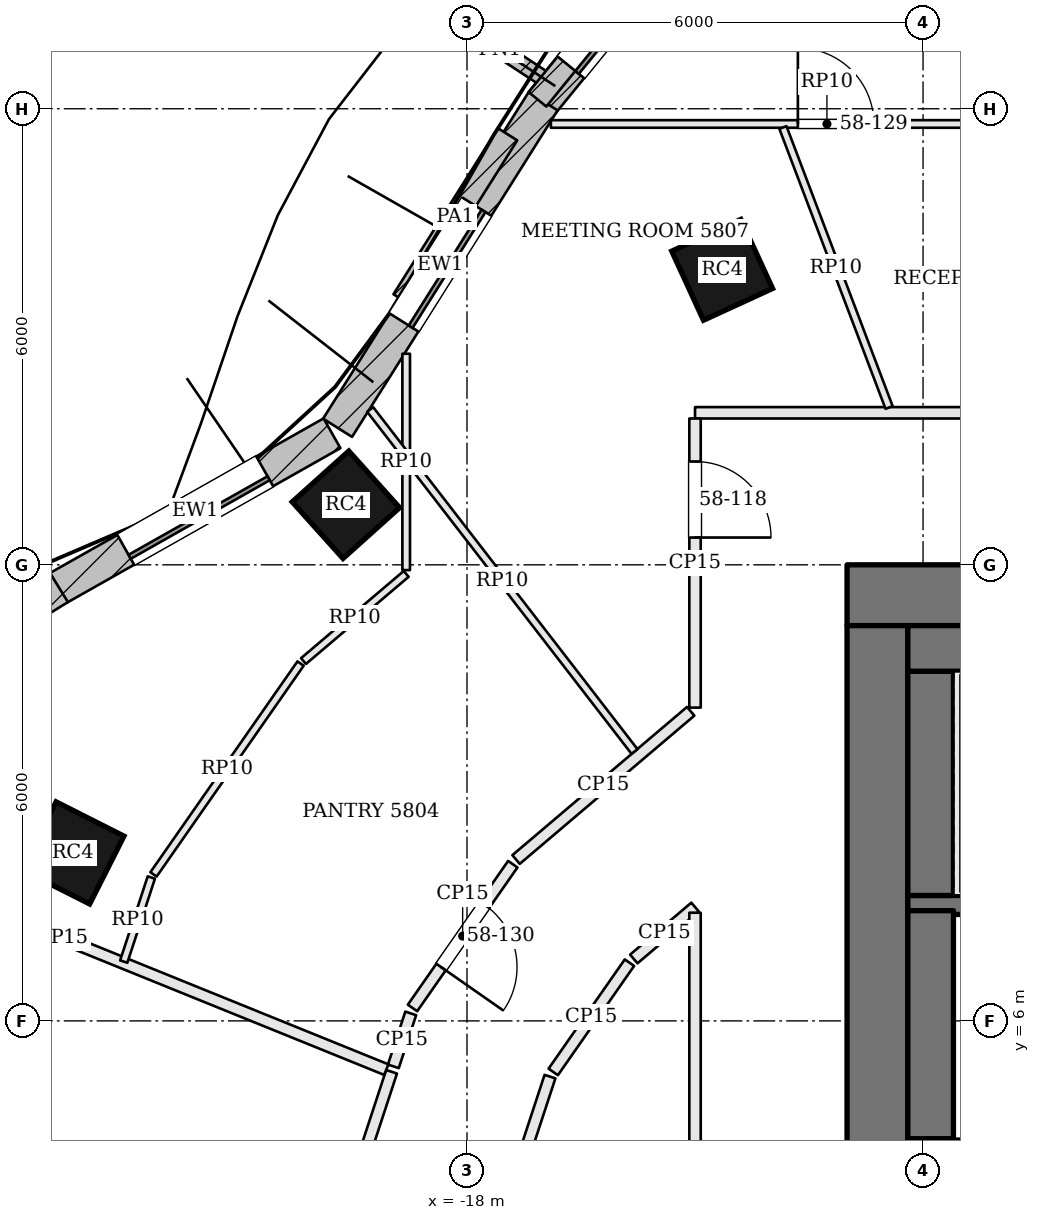
"""IFC4 building model, lengths in metres.
Left out: names, types, materials, properties, quantities, classifications, styles, units other than length and angle.
Written with IfcOpenShell. Run it as: python <this file> out.ifc"""

import sys

from ifc_helpers import new_model, si_unit, direction, frame, frame_2d, origin, origin_2d, place, context, subcontext, project, spatial, rectangle, extrude, element, fill, save


model = new_model("IFC4")
c1 = context("Model", 3, precision=1e-05, world=origin(), true_north=direction((0.0, 1.0)))
c2 = subcontext(c1, "Body", "Model", "MODEL_VIEW")
j1 = project(units=[si_unit("LENGTHUNIT", "METRE"), si_unit("PLANEANGLEUNIT", "RADIAN")], contexts=[c1])
p1 = place(None, origin())
s1 = spatial("IfcSite", under=j1, at=p1, CompositionType="ELEMENT")
p2 = place(p1, origin())
s2 = spatial("IfcBuilding", under=s1, at=p2, CompositionType="ELEMENT")
p3 = place(p2, frame((0.0, 0.0, 237.0)))
s3 = spatial("IfcBuildingStorey", under=s2, at=p3, CompositionType="ELEMENT", Elevation=237.0)
p4 = place(p3, frame((-13.0, 11.6, 0.0), z_axis=(0.0, 0.0, 1.0), x_axis=(1.0, 0.0, 0.0)))
e1 = element("IfcWall", 1, at=p4, inside=s3, PredefinedType="SHEAR", context=c2, shape_type="SweptSolid", body=[
    extrude(rectangle(XDim=26.0, YDim=0.8, at=frame_2d((13.0, 0.0))), origin(), (0.0, 0.0, 1.0), 3.9),
])
p5 = place(p4, frame((8.575, 0.0, 0.0)))
e2 = element("IfcOpeningElement", 2, at=p5, cuts=e1, PredefinedType="OPENING", context=c2, shape_type="SweptSolid", body=[
    extrude(rectangle(XDim=0.7, YDim=2.1, at=frame_2d((0.35, 1.05))), frame((0.0, 0.41, 0.0), z_axis=(0.0, -1.0, 0.0), x_axis=(1.0, 0.0, 0.0)), (0.0, 0.0, 1.0), 0.82),
])
p6 = place(p4, frame((10.625, 0.0, 0.0)))
e3 = element("IfcOpeningElement", 3, at=p6, cuts=e1, PredefinedType="OPENING", context=c2, shape_type="SweptSolid", body=[
    extrude(rectangle(XDim=0.7, YDim=2.1, at=frame_2d((0.35, 1.05))), frame((0.0, 0.41, 0.0), z_axis=(0.0, -1.0, 0.0), x_axis=(1.0, 0.0, 0.0)), (0.0, 0.0, 1.0), 0.82),
])
p7 = place(p4, frame((13.325, 0.0, 0.0)))
e4 = element("IfcOpeningElement", 4, at=p7, cuts=e1, PredefinedType="OPENING", context=c2, shape_type="SweptSolid", body=[
    extrude(rectangle(XDim=1.0, YDim=2.1, at=frame_2d((0.5, 1.05))), frame((0.0, 0.41, 0.0), z_axis=(0.0, -1.0, 0.0), x_axis=(1.0, 0.0, 0.0)), (0.0, 0.0, 1.0), 0.82),
])
p8 = place(p4, frame((15.65, 0.0, 0.0)))
e5 = element("IfcOpeningElement", 5, at=p8, cuts=e1, PredefinedType="OPENING", context=c2, shape_type="SweptSolid", body=[
    extrude(rectangle(XDim=1.0, YDim=2.1, at=frame_2d((0.5, 1.05))), frame((0.0, 0.41, 0.0), z_axis=(0.0, -1.0, 0.0), x_axis=(1.0, 0.0, 0.0)), (0.0, 0.0, 1.0), 0.82),
])
p9 = place(p3, frame((-12.6, -2.2, 0.0), z_axis=(0.0, 0.0, 1.0), x_axis=(0.0, 1.0, 0.0)))
e6 = element("IfcWall", 6, at=p9, inside=s3, PredefinedType="SHEAR", context=c2, shape_type="SweptSolid", body=[
    extrude(rectangle(XDim=13.4, YDim=0.8, at=frame_2d((6.7, 0.0))), origin(), (0.0, 0.0, 1.0), 3.9),
])
p10 = place(p9, frame((4.2, 0.0, 0.0)))
e7 = element("IfcOpeningElement", 7, at=p10, cuts=e6, PredefinedType="OPENING", context=c2, shape_type="SweptSolid", body=[
    extrude(rectangle(XDim=1.8, YDim=2.1, at=frame_2d((0.9, 1.05))), frame((0.0, 0.41, 0.0), z_axis=(0.0, -1.0, 0.0), x_axis=(1.0, 0.0, 0.0)), (0.0, 0.0, 1.0), 0.82),
])
for number, where, z_axis, x_axis in (
    (8, (-14.643, 15.881, 0.0), (0.0, 0.0, 1.0), (-0.909, -0.417, 0.0)),
    (9, (-19.593, 12.79, 0.0), (0.0, 0.0, 1.0), (-0.744, -0.668, 0.0)),
    (10, (-23.185, 8.21, 0.0), (0.0, 0.0, 1.0), (-0.451, -0.893, 0.0)),
):
    element("IfcColumn", number, at=place(p3, frame(where, z_axis=z_axis, x_axis=x_axis)), inside=s3, PredefinedType="COLUMN", context=c2, shape_type="SweptSolid", body=[
        extrude(rectangle(XDim=1.0, YDim=1.0, at=origin_2d()), origin(), (0.0, 0.0, 1.0), 3.9),
    ])
p11 = place(p3, frame((-14.926, 20.641, 0.0), z_axis=(0.0, 0.0, 1.0), x_axis=(-0.631548074669, -0.775336720001, 0.0)))
e11 = element("IfcWall", 11, at=p11, inside=s3, PredefinedType="SOLIDWALL", context=c2, shape_type="SweptSolid", body=[
    extrude(rectangle(XDim=3.308, YDim=0.45, at=frame_2d((1.654, 0.0))), origin(), (0.0, 0.0, 1.0), 3.7),
])
p12 = place(p11, frame((0.604, 0.0, 0.9)))
e12 = element("IfcOpeningElement", 12, at=p12, cuts=e11, PredefinedType="OPENING", context=c2, shape_type="SweptSolid", body=[
    extrude(rectangle(XDim=2.1, YDim=2.3, at=frame_2d((1.05, 1.15))), frame((0.0, 0.235, 0.0), z_axis=(0.0, -1.0, 0.0), x_axis=(1.0, 0.0, 0.0)), (0.0, 0.0, 1.0), 0.47),
])
p13 = place(p3, frame((-16.998, 18.099, 0.0), z_axis=(0.0, 0.0, 1.0), x_axis=(-0.532745661304, -0.846275404559, 0.0)))
e13 = element("IfcWall", 13, at=p13, inside=s3, PredefinedType="SOLIDWALL", context=c2, shape_type="SweptSolid", body=[
    extrude(rectangle(XDim=5.076, YDim=0.45, at=frame_2d((2.538, 0.0))), origin(), (0.0, 0.0, 1.0), 3.7),
])
p14 = place(p13, frame((1.638, 0.0, 0.9)))
e14 = element("IfcOpeningElement", 14, at=p14, cuts=e13, PredefinedType="OPENING", context=c2, shape_type="SweptSolid", body=[
    extrude(rectangle(XDim=1.8, YDim=2.3, at=frame_2d((0.9, 1.15))), frame((0.0, 0.235, 0.0), z_axis=(0.0, -1.0, 0.0), x_axis=(1.0, 0.0, 0.0)), (0.0, 0.0, 1.0), 0.47),
])
p15 = place(p3, frame((-19.776, 13.731, 0.0), z_axis=(0.0, 0.0, 1.0), x_axis=(-0.870610133829, -0.491973571318, 0.0)))
e15 = element("IfcWall", 15, at=p15, inside=s3, PredefinedType="SOLIDWALL", context=c2, shape_type="SweptSolid", body=[
    extrude(rectangle(XDim=4.134, YDim=0.45, at=frame_2d((2.067, 0.0))), origin(), (0.0, 0.0, 1.0), 3.7),
])
p16 = place(p15, frame((1.017, 0.0, 0.9)))
e16 = element("IfcOpeningElement", 16, at=p16, cuts=e15, PredefinedType="OPENING", context=c2, shape_type="SweptSolid", body=[
    extrude(rectangle(XDim=2.1, YDim=2.3, at=frame_2d((1.05, 1.15))), frame((0.0, 0.235, 0.0), z_axis=(0.0, -1.0, 0.0), x_axis=(1.0, 0.0, 0.0)), (0.0, 0.0, 1.0), 0.47),
])
p17 = place(p3, frame((-23.368, 11.701, 0.0), z_axis=(0.0, 0.0, 1.0), x_axis=(-0.850251408633, -0.526376806211, 0.0)))
e17 = element("IfcWall", 17, at=p17, inside=s3, PredefinedType="SOLIDWALL", context=c2, shape_type="SweptSolid", body=[
    extrude(rectangle(XDim=5.302, YDim=0.45, at=frame_2d((2.651, 0.0))), origin(), (0.0, 0.0, 1.0), 3.7),
])
p18 = place(p17, frame((1.601, 0.0, 0.9)))
e18 = element("IfcOpeningElement", 18, at=p18, cuts=e17, PredefinedType="OPENING", context=c2, shape_type="SweptSolid", body=[
    extrude(rectangle(XDim=2.1, YDim=2.3, at=frame_2d((1.05, 1.15))), frame((0.0, 0.235, 0.0), z_axis=(0.0, -1.0, 0.0), x_axis=(1.0, 0.0, 0.0)), (0.0, 0.0, 1.0), 0.47),
])
p19 = place(p3, frame((-16.838, 18.298, 0.0), z_axis=(0.0, 0.0, 1.0), x_axis=(-0.835871900419, 0.548924554097, 0.0)))
e19 = element("IfcWall", 19, at=p19, inside=s3, PredefinedType="SOLIDWALL", context=c2, shape_type="SweptSolid", body=[
    extrude(rectangle(XDim=1.75, YDim=0.2, at=frame_2d((0.875, 0.0))), origin(), (0.0, 0.0, 1.0), 3.7),
])
p20 = place(p3, frame((-15.063, 20.591, 3.9), z_axis=(0.0, 0.0, 1.0), x_axis=(-0.631539712948, -0.775343530939, 0.0)))
e20 = element("IfcWall", 20, at=p20, inside=s3, PredefinedType="PARAPET", context=c2, shape_type="SweptSolid", body=[
    extrude(rectangle(XDim=3.182, YDim=0.3, at=frame_2d((1.591, 0.0))), origin(), (0.0, 0.0, 1.0), 1.1),
])
p21 = place(p3, frame((-17.466, 17.664, 3.9), z_axis=(0.0, 0.0, 1.0), x_axis=(-0.532743008157, -0.846277074758, 0.0)))
e21 = element("IfcWall", 21, at=p21, inside=s3, PredefinedType="PARAPET", context=c2, shape_type="SweptSolid", body=[
    extrude(rectangle(XDim=2.581, YDim=0.3, at=frame_2d((1.29, 0.0))), origin(), (0.0, 0.0, 1.0), 1.1),
])
p22 = place(p3, frame((-12.2, 4.35, 0.0), z_axis=(0.0, 0.0, 1.0), x_axis=(1.0, 0.0, 0.0)))
e22 = element("IfcWall", 22, at=p22, inside=s3, PredefinedType="SOLIDWALL", context=c2, shape_type="SweptSolid", body=[
    extrude(rectangle(XDim=7.1, YDim=0.2, at=frame_2d((3.55, 0.0))), origin(), (0.0, 0.0, 1.0), 3.7),
])
p23 = place(p22, frame((4.4, 0.0, 0.0)))
e23 = element("IfcOpeningElement", 23, at=p23, cuts=e22, PredefinedType="OPENING", context=c2, shape_type="SweptSolid", body=[
    extrude(rectangle(XDim=1.2, YDim=2.1, at=frame_2d((0.6, 1.05))), frame((0.0, 0.11, 0.0), z_axis=(0.0, -1.0, 0.0), x_axis=(1.0, 0.0, 0.0)), (0.0, 0.0, 1.0), 0.22),
])
p24 = place(p22, frame((1.1, 0.0, 0.0)))
e24 = element("IfcOpeningElement", 24, at=p24, cuts=e22, PredefinedType="OPENING", context=c2, shape_type="SweptSolid", body=[
    extrude(rectangle(XDim=1.2, YDim=2.1, at=frame_2d((0.6, 1.05))), frame((0.0, 0.11, 0.0), z_axis=(0.0, -1.0, 0.0), x_axis=(1.0, 0.0, 0.0)), (0.0, 0.0, 1.0), 0.22),
])
p25 = place(p3, frame((-12.2, 7.525, 0.0), z_axis=(0.0, 0.0, 1.0), x_axis=(1.0, 0.0, 0.0)))
e25 = element("IfcWall", 25, at=p25, inside=s3, PredefinedType="SOLIDWALL", context=c2, shape_type="SweptSolid", body=[
    extrude(rectangle(XDim=7.1, YDim=0.25, at=frame_2d((3.55, 0.0))), origin(), (0.0, 0.0, 1.0), 3.7),
])
p26 = place(p25, frame((5.8, 0.0, 0.0)))
e26 = element("IfcOpeningElement", 26, at=p26, cuts=e25, PredefinedType="OPENING", context=c2, shape_type="SweptSolid", body=[
    extrude(rectangle(XDim=1.2, YDim=2.1, at=frame_2d((0.6, 1.05))), frame((0.0, 0.135, 0.0), z_axis=(0.0, -1.0, 0.0), x_axis=(1.0, 0.0, 0.0)), (0.0, 0.0, 1.0), 0.27),
])
p27 = place(p3, frame((-11.9, 4.45, 0.0), z_axis=(0.0, 0.0, 1.0), x_axis=(0.0, 1.0, 0.0)))
e27 = element("IfcWall", 27, at=p27, inside=s3, PredefinedType="SOLIDWALL", context=c2, shape_type="SweptSolid", body=[
    extrude(rectangle(XDim=3.0, YDim=0.6, at=frame_2d((1.5, 0.0))), origin(), (0.0, 0.0, 1.0), 3.7),
])
p28 = place(p3, frame((-11.9, 7.65, 0.0), z_axis=(0.0, 0.0, 1.0), x_axis=(0.0, 1.0, 0.0)))
e28 = element("IfcWall", 28, at=p28, inside=s3, PredefinedType="SOLIDWALL", context=c2, shape_type="SweptSolid", body=[
    extrude(rectangle(XDim=2.95, YDim=0.6, at=frame_2d((1.475, 0.0))), origin(), (0.0, 0.0, 1.0), 3.7),
])
p29 = place(p3, frame((-12.2, 10.9, 0.0), z_axis=(0.0, 0.0, 1.0), x_axis=(1.0, 0.0, 0.0)))
e29 = element("IfcWall", 29, at=p29, inside=s3, PredefinedType="SOLIDWALL", context=c2, shape_type="SweptSolid", body=[
    extrude(rectangle(XDim=7.1, YDim=0.6, at=frame_2d((3.55, 0.0))), origin(), (0.0, 0.0, 1.0), 3.7),
])
p30 = place(p3, frame((-18.992, 5.331, 0.0), z_axis=(0.0, 0.0, 1.0), x_axis=(-0.311856589449, -0.950129184699, 0.0)))
e30 = element("IfcWall", 30, at=p30, inside=s3, PredefinedType="PARTITIONING", context=c2, shape_type="SweptSolid", body=[
    extrude(rectangle(XDim=2.398, YDim=0.15, at=frame_2d((1.199, 0.0))), origin(), (0.0, 0.0, 1.0), 3.084),
])
p31 = place(p3, frame((-27.593, 8.816, 0.0), z_axis=(0.0, 0.0, 1.0), x_axis=(0.926782441749, -0.375598596463, 0.0)))
e31 = element("IfcWall", 31, at=p31, inside=s3, PredefinedType="PARTITIONING", context=c2, shape_type="SweptSolid", body=[
    extrude(rectangle(XDim=9.205, YDim=0.15, at=frame_2d((4.602, 0.0))), origin(), (0.0, 0.0, 1.0), 3.184),
])
p32 = place(p3, frame((-2.8, 14.0, 0.0), z_axis=(0.0, 0.0, 1.0), x_axis=(-1.0, 0.0, 0.0)))
e32 = element("IfcWall", 32, at=p32, inside=s3, PredefinedType="PARTITIONING", context=c2, shape_type="SweptSolid", body=[
    extrude(rectangle(XDim=12.2, YDim=0.15, at=frame_2d((6.1, 0.0))), origin(), (0.0, 0.0, 1.0), 3.084),
])
p33 = place(p32, frame((3.872, 0.0, 0.0)))
e33 = element("IfcOpeningElement", 33, at=p33, cuts=e32, PredefinedType="OPENING", context=c2, shape_type="SweptSolid", body=[
    extrude(rectangle(XDim=1.8, YDim=2.1, at=frame_2d((0.9, 1.05))), frame((0.0, 0.085, 0.0), z_axis=(0.0, -1.0, 0.0), x_axis=(1.0, 0.0, 0.0)), (0.0, 0.0, 1.0), 0.17),
])
p34 = place(p3, frame((-15.0, 13.925, 0.0), z_axis=(0.0, 0.0, 1.0), x_axis=(0.0, -1.0, 0.0)))
e34 = element("IfcWall", 34, at=p34, inside=s3, PredefinedType="PARTITIONING", context=c2, shape_type="SweptSolid", body=[
    extrude(rectangle(XDim=3.803, YDim=0.15, at=frame_2d((1.902, 0.0))), origin(), (0.0, 0.0, 1.0), 3.084),
])
p35 = place(p34, frame((0.566, 0.0, 0.0)))
e35 = element("IfcOpeningElement", 35, at=p35, cuts=e34, PredefinedType="OPENING", context=c2, shape_type="SweptSolid", body=[
    extrude(rectangle(XDim=1.0, YDim=2.4, at=frame_2d((0.5, 1.2))), frame((0.0, 0.085, 0.0), z_axis=(0.0, -1.0, 0.0), x_axis=(1.0, 0.0, 0.0)), (0.0, 0.0, 1.0), 0.17),
])
p36 = place(p3, frame((-15.057, 10.073, 0.0), z_axis=(0.0, 0.0, 1.0), x_axis=(-0.762398905861, -0.647107339119, 0.0)))
e36 = element("IfcWall", 36, at=p36, inside=s3, PredefinedType="PARTITIONING", context=c2, shape_type="SweptSolid", body=[
    extrude(rectangle(XDim=3.013, YDim=0.15, at=frame_2d((1.507, 0.0))), origin(), (0.0, 0.0, 1.0), 3.084),
])
p37 = place(p3, frame((-17.397, 8.062, 0.0), z_axis=(0.0, 0.0, 1.0), x_axis=(-0.572118665737, -0.820170855563, 0.0)))
e37 = element("IfcWall", 37, at=p37, inside=s3, PredefinedType="PARTITIONING", context=c2, shape_type="SweptSolid", body=[
    extrude(rectangle(XDim=2.306, YDim=0.15, at=frame_2d((1.153, 0.0))), origin(), (0.0, 0.0, 1.0), 3.084),
])
p38 = place(p37, frame((0.65, 0.0, 0.0)))
e38 = element("IfcOpeningElement", 38, at=p38, cuts=e37, PredefinedType="OPENING", context=c2, shape_type="SweptSolid", body=[
    extrude(rectangle(XDim=1.0, YDim=2.1, at=frame_2d((0.5, 1.05))), frame((0.0, 0.085, 0.0), z_axis=(0.0, -1.0, 0.0), x_axis=(1.0, 0.0, 0.0)), (0.0, 0.0, 1.0), 0.17),
])
p39 = place(p3, frame((-18.74, 6.099, 0.0), z_axis=(0.0, 0.0, 1.0), x_axis=(-0.311930077778, -0.95010506081, 0.0)))
e39 = element("IfcWall", 39, at=p39, inside=s3, PredefinedType="PARTITIONING", context=c2, shape_type="SweptSolid", body=[
    extrude(rectangle(XDim=0.733, YDim=0.15, at=frame_2d((0.367, 0.0))), origin(), (0.0, 0.0, 1.0), 3.084),
])
p40 = place(p3, frame((-17.739, 2.738, 0.0), z_axis=(0.0, 0.0, 1.0), x_axis=(0.311904957484, 0.950113307715, 0.0)))
e40 = element("IfcWall", 40, at=p40, inside=s3, PredefinedType="PARTITIONING", context=c2, shape_type="SweptSolid", body=[
    extrude(rectangle(XDim=2.662, YDim=0.15, at=frame_2d((1.331, 0.0))), origin(), (0.0, 0.0, 1.0), 3.084),
])
p41 = place(p3, frame((-16.865, 5.329, 0.0), z_axis=(0.0, 0.0, 1.0), x_axis=(0.572096615639, 0.820186236397, 0.0)))
e41 = element("IfcWall", 41, at=p41, inside=s3, PredefinedType="PARTITIONING", context=c2, shape_type="SweptSolid", body=[
    extrude(rectangle(XDim=1.753, YDim=0.15, at=frame_2d((0.876, 0.0))), origin(), (0.0, 0.0, 1.0), 3.084),
])
p42 = place(p3, frame((-15.805, 6.814, 0.0), z_axis=(0.0, 0.0, 1.0), x_axis=(0.762298381233, 0.647225755027, 0.0)))
e42 = element("IfcWall", 42, at=p42, inside=s3, PredefinedType="PARTITIONING", context=c2, shape_type="SweptSolid", body=[
    extrude(rectangle(XDim=1.057, YDim=0.15, at=frame_2d((0.528, 0.0))), origin(), (0.0, 0.0, 1.0), 3.084),
])
p43 = place(p3, frame((-15.0, 7.423, 0.0), z_axis=(0.0, 0.0, 1.0), x_axis=(0.0, -1.0, 0.0)))
e43 = element("IfcWall", 43, at=p43, inside=s3, PredefinedType="PARTITIONING", context=c2, shape_type="SweptSolid", body=[
    extrude(rectangle(XDim=12.423, YDim=0.15, at=frame_2d((6.211, 0.0))), origin(), (0.0, 0.0, 1.0), 3.084),
])
p44 = place(p43, frame((5.174, 0.0, 0.0)))
e44 = element("IfcOpeningElement", 44, at=p44, cuts=e43, PredefinedType="OPENING", context=c2, shape_type="SweptSolid", body=[
    extrude(rectangle(XDim=1.0, YDim=2.1, at=frame_2d((0.5, 1.05))), frame((0.0, 0.085, 0.0), z_axis=(0.0, -1.0, 0.0), x_axis=(1.0, 0.0, 0.0)), (0.0, 0.0, 1.0), 0.17),
])
p45 = place(p3, frame((-16.897, 17.8, 0.0), z_axis=(0.0, 0.0, 1.0), x_axis=(1.0, 0.0, 0.0)))
e45 = element("IfcWall", 45, at=p45, inside=s3, PredefinedType="PARTITIONING", context=c2, shape_type="SweptSolid", body=[
    extrude(rectangle(XDim=7.264, YDim=0.1, at=frame_2d((3.632, 0.0))), origin(), (0.0, 0.0, 1.0), 3.084),
])
p46 = place(p45, frame((3.25, 0.0, 0.0)))
e46 = element("IfcOpeningElement", 46, at=p46, cuts=e45, PredefinedType="OPENING", context=c2, shape_type="SweptSolid", body=[
    extrude(rectangle(XDim=1.0, YDim=2.1, at=frame_2d((0.5, 1.05))), frame((0.0, 0.06, 0.0), z_axis=(0.0, -1.0, 0.0), x_axis=(1.0, 0.0, 0.0)), (0.0, 0.0, 1.0), 0.12),
])
p47 = place(p3, frame((-22.516, 6.78, 0.0), z_axis=(0.0, 0.0, 1.0), x_axis=(0.31194500702, 0.950100159244, 0.0)))
e47 = element("IfcWall", 47, at=p47, inside=s3, PredefinedType="PARTITIONING", context=c2, shape_type="SweptSolid", body=[
    extrude(rectangle(XDim=1.164, YDim=0.1, at=frame_2d((0.582, 0.0))), origin(), (0.0, 0.0, 1.0), 3.084),
])
p48 = place(p3, frame((-22.125, 7.927, 0.0), z_axis=(0.0, 0.0, 1.0), x_axis=(0.572100301866, 0.820183665166, 0.0)))
e48 = element("IfcWall", 48, at=p48, inside=s3, PredefinedType="PARTITIONING", context=c2, shape_type="SweptSolid", body=[
    extrude(rectangle(XDim=3.382, YDim=0.1, at=frame_2d((1.691, 0.0))), origin(), (0.0, 0.0, 1.0), 3.084),
])
p49 = place(p3, frame((-20.151, 10.734, 0.0), z_axis=(0.0, 0.0, 1.0), x_axis=(0.762465888028, 0.647028414827, 0.0)))
e49 = element("IfcWall", 49, at=p49, inside=s3, PredefinedType="PARTITIONING", context=c2, shape_type="SweptSolid", body=[
    extrude(rectangle(XDim=1.772, YDim=0.1, at=frame_2d((0.886, 0.0))), origin(), (0.0, 0.0, 1.0), 3.084),
])
p50 = place(p3, frame((-18.8, 11.93, 0.0), z_axis=(0.0, 0.0, 1.0), x_axis=(0.0, 1.0, 0.0)))
e50 = element("IfcWall", 50, at=p50, inside=s3, PredefinedType="PARTITIONING", context=c2, shape_type="SweptSolid", body=[
    extrude(rectangle(XDim=2.846, YDim=0.1, at=frame_2d((1.423, 0.0))), origin(), (0.0, 0.0, 1.0), 3.084),
])
p51 = place(p3, frame((-12.447, 14.07, 0.0), z_axis=(0.0, 0.0, 1.0), x_axis=(-0.35453091347, 0.935044293814, 0.0)))
e51 = element("IfcWall", 51, at=p51, inside=s3, PredefinedType="PARTITIONING", context=c2, shape_type="SweptSolid", body=[
    extrude(rectangle(XDim=3.939, YDim=0.1, at=frame_2d((1.969, 0.0))), origin(), (0.0, 0.0, 1.0), 3.084),
])
p52 = place(p3, frame((-15.796, 9.544, 0.0), z_axis=(0.0, 0.0, 1.0), x_axis=(-0.611503699707, 0.79124157199, 0.0)))
e52 = element("IfcWall", 52, at=p52, inside=s3, PredefinedType="PARTITIONING", context=c2, shape_type="SweptSolid", body=[
    extrude(rectangle(XDim=5.687, YDim=0.1, at=frame_2d((2.844, 0.0))), origin(), (0.0, 0.0, 1.0), 3.084),
])
p53 = place(p12, origin())
e53 = element("IfcWindow", 53, at=p53, inside=s3, PartitioningType="SINGLE_PANEL", PredefinedType="WINDOW", context=c2, shape_type="SweptSolid", body=[
    extrude(rectangle(XDim=2.1, YDim=2.3, at=frame_2d((1.05, 1.15))), frame((0.0, 0.135, 0.0), z_axis=(0.0, -1.0, 0.0), x_axis=(1.0, 0.0, 0.0)), (0.0, 0.0, 1.0), 0.06),
])
fill(e12, e53)
p54 = place(p14, origin())
e54 = element("IfcWindow", 54, at=p54, inside=s3, PartitioningType="SINGLE_PANEL", PredefinedType="WINDOW", context=c2, shape_type="SweptSolid", body=[
    extrude(rectangle(XDim=1.8, YDim=2.3, at=frame_2d((0.9, 1.15))), frame((0.0, 0.135, 0.0), z_axis=(0.0, -1.0, 0.0), x_axis=(1.0, 0.0, 0.0)), (0.0, 0.0, 1.0), 0.06),
])
fill(e14, e54)
p55 = place(p16, origin())
e55 = element("IfcWindow", 55, at=p55, inside=s3, PartitioningType="SINGLE_PANEL", PredefinedType="WINDOW", context=c2, shape_type="SweptSolid", body=[
    extrude(rectangle(XDim=2.1, YDim=2.3, at=frame_2d((1.05, 1.15))), frame((0.0, 0.135, 0.0), z_axis=(0.0, -1.0, 0.0), x_axis=(1.0, 0.0, 0.0)), (0.0, 0.0, 1.0), 0.06),
])
fill(e16, e55)
p56 = place(p35, origin())
e56 = element("IfcDoor", 56, at=p56, inside=s3, OperationType="SINGLE_SWING_RIGHT", PredefinedType="DOOR", context=c2, shape_type="SweptSolid", body=[
    extrude(rectangle(XDim=1.0, YDim=2.4, at=frame_2d((0.5, 1.2))), frame((0.0, 0.025, 0.0), z_axis=(0.0, -1.0, 0.0), x_axis=(1.0, 0.0, 0.0)), (0.0, 0.0, 1.0), 0.05),
])
fill(e35, e56)
p57 = place(p46, origin())
e57 = element("IfcDoor", 57, at=p57, inside=s3, OperationType="SINGLE_SWING_LEFT", PredefinedType="DOOR", context=c2, shape_type="SweptSolid", body=[
    extrude(rectangle(XDim=1.0, YDim=2.1, at=frame_2d((0.5, 1.05))), frame((0.0, 0.025, 0.0), z_axis=(0.0, -1.0, 0.0), x_axis=(1.0, 0.0, 0.0)), (0.0, 0.0, 1.0), 0.05),
])
fill(e46, e57)
p58 = place(p38, origin())
e58 = element("IfcDoor", 58, at=p58, inside=s3, OperationType="SINGLE_SWING_RIGHT", PredefinedType="DOOR", context=c2, shape_type="SweptSolid", body=[
    extrude(rectangle(XDim=1.0, YDim=2.1, at=frame_2d((0.5, 1.05))), frame((0.0, 0.025, 0.0), z_axis=(0.0, -1.0, 0.0), x_axis=(1.0, 0.0, 0.0)), (0.0, 0.0, 1.0), 0.05),
])
fill(e38, e58)
save(model, sys.argv[1])
